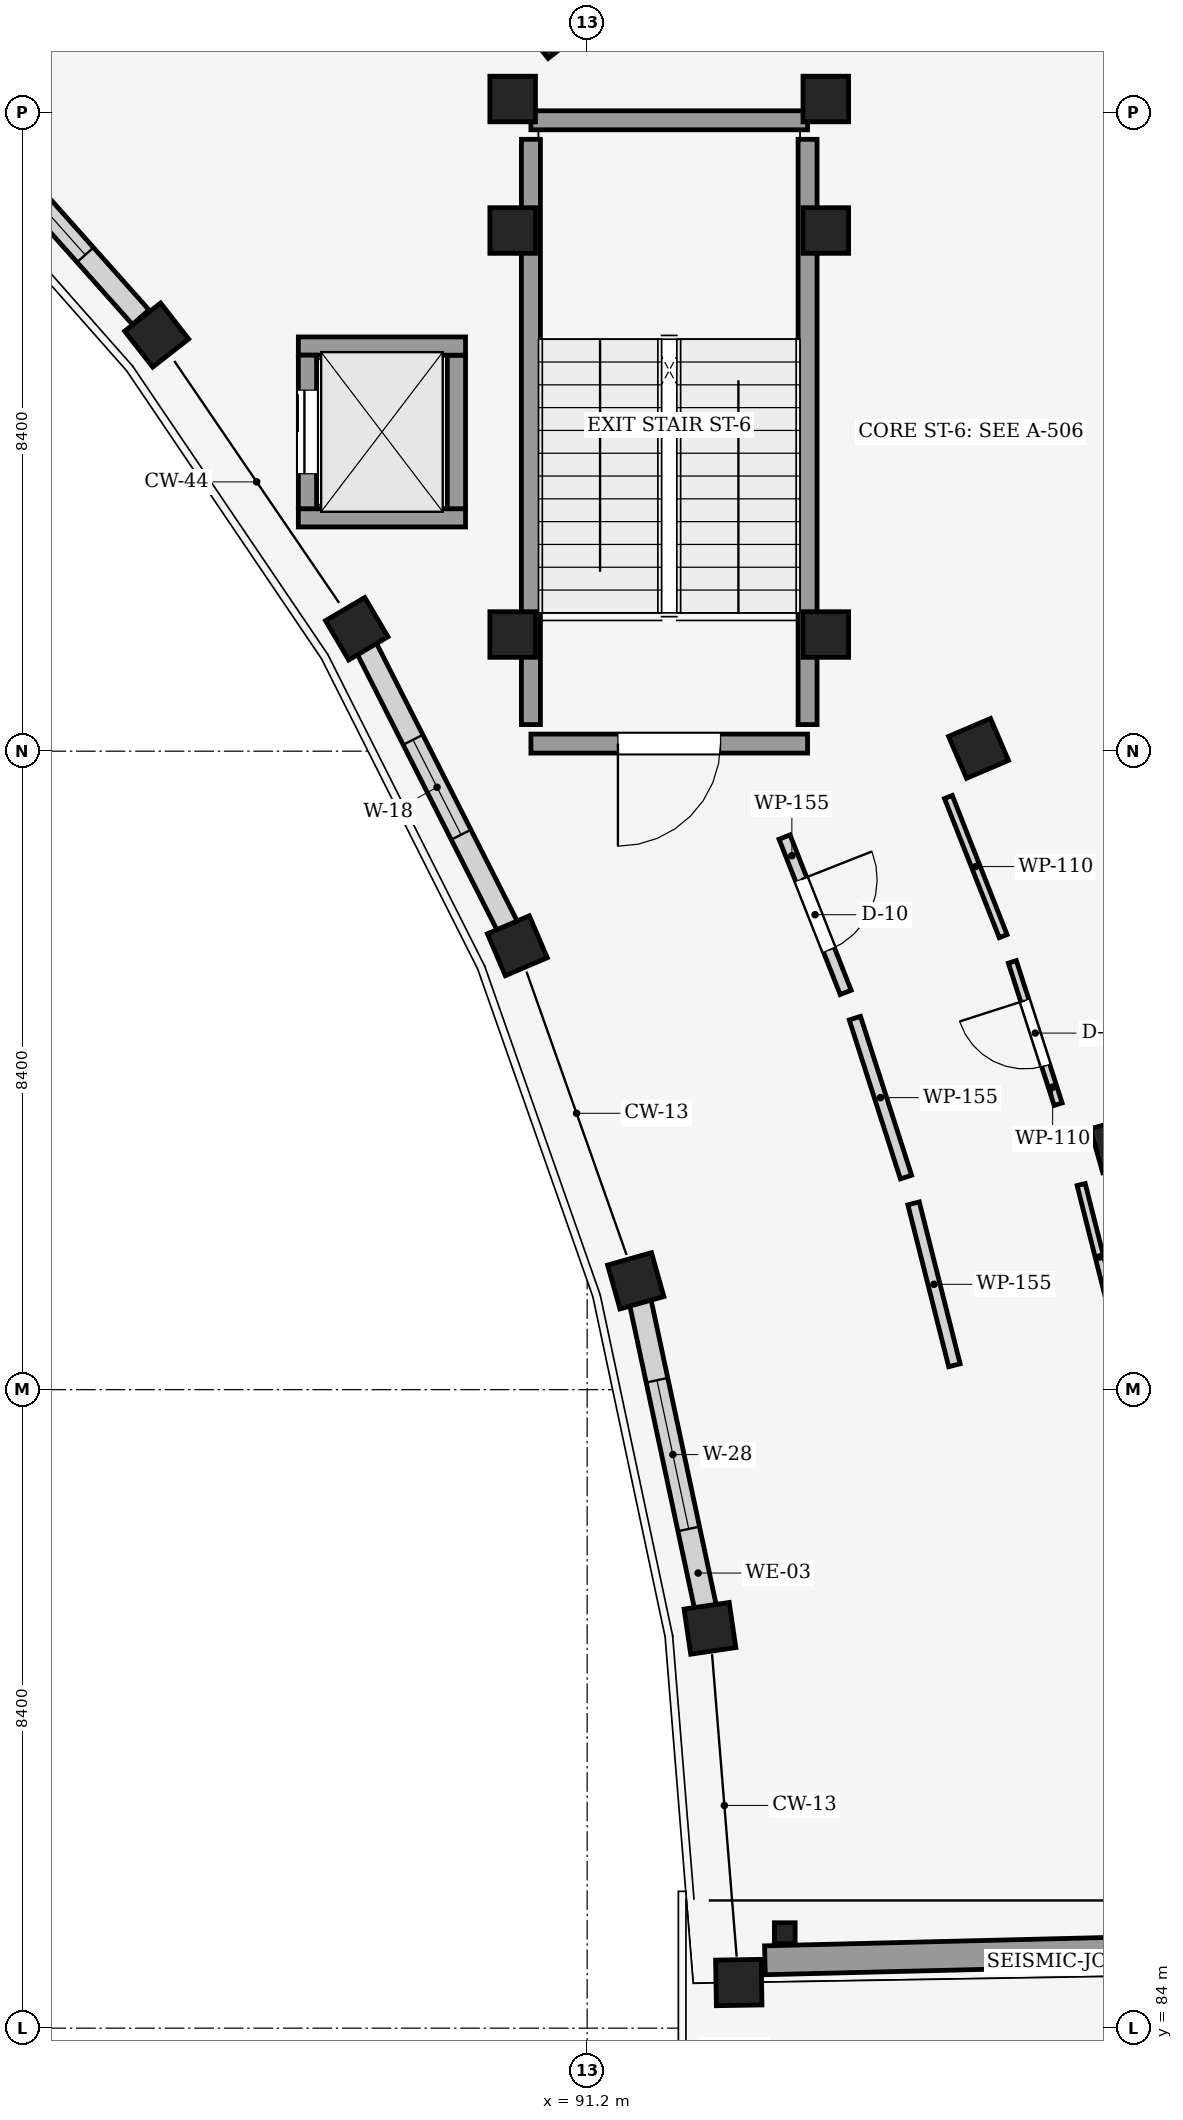
"""IFC4 building model, lengths in metres.
Left out: names, types, materials, properties, quantities, classifications, styles, units other than length and angle.
Written with IfcOpenShell. Run it as: python <this file> out.ifc"""

import sys

from ifc_helpers import new_model, si_unit, direction, frame, frame_2d, origin, origin_2d, place, context, subcontext, project, spatial, rectangle, hollow_circle, extrude, element, fill, save


model = new_model("IFC4")
c1 = context("Model", 3, precision=1e-05, world=origin(), true_north=direction((0.0, 1.0)))
c2 = subcontext(c1, "Body", "Model", "MODEL_VIEW")
j1 = project(units=[si_unit("LENGTHUNIT", "METRE"), si_unit("PLANEANGLEUNIT", "RADIAN")], contexts=[c1])
p1 = place(None, origin())
s1 = spatial("IfcSite", under=j1, at=p1, CompositionType="ELEMENT")
p2 = place(p1, origin())
s2 = spatial("IfcBuilding", under=s1, at=p2, CompositionType="ELEMENT")
p3 = place(p2, frame((0.0, 0.0, 17.25)))
s3 = spatial("IfcBuildingStorey", under=s2, at=p3, CompositionType="ELEMENT", Elevation=17.25)
for number, where, z_axis, x_axis in (
    (1, (93.195, 84.6, 0.0), (0.0, 0.0, 1.0), (1.0, 0.017, 0.0)),
    (2, (92.816, 89.26, 0.0), (0.0, 0.0, 1.0), (0.989, 0.145, 0.0)),
    (3, (91.839, 93.832, 0.0), (0.0, 0.0, 1.0), (0.962, 0.272, 0.0)),
    (4, (98.191, 95.625, 0.0), (0.0, 0.0, 1.0), (0.962, 0.272, 0.0)),
    (5, (90.281, 98.24, 0.0), (0.0, 0.0, 1.0), (0.919, 0.393, 0.0)),
    (6, (96.349, 100.837, 0.0), (0.0, 0.0, 1.0), (0.919, 0.393, 0.0)),
    (7, (88.168, 102.411, 0.0), (0.0, 0.0, 1.0), (0.861, 0.509, 0.0)),
    (8, (85.536, 106.274, 0.0), (0.0, 0.0, 1.0), (0.788, 0.615, 0.0)),
    (9, (90.738, 110.336, 0.0), (0.0, 0.0, 1.0), (0.788, 0.615, 0.0)),
):
    element("IfcColumn", number, at=place(p3, frame(where, z_axis=z_axis, x_axis=x_axis)), inside=s3, PredefinedType="COLUMN", context=c2, shape_type="SweptSolid", body=[
        extrude(rectangle(XDim=0.6, YDim=0.6, at=origin_2d()), origin(), (0.0, 0.0, 1.0), 4.05),
    ])
p4 = place(p3, frame((93.8, 85.25, 0.0), z_axis=(0.0, 0.0, 1.0), x_axis=(1.0, 0.0, 0.0)))
e10 = element("IfcColumn", 10, at=p4, inside=s3, PredefinedType="COLUMN", context=c2, shape_type="SweptSolid", body=[
    extrude(hollow_circle(Radius=0.136, WallThickness=0.016, at=origin_2d()), origin(), (0.0, 0.0, 1.0), 3.82),
])
for number, where, z_axis, x_axis in (
    (11, (94.34, 102.335, 0.0), (0.0, 0.0, 1.0), (1.0, 0.0, 0.0)),
    (12, (90.22, 102.335, 0.0), (0.0, 0.0, 1.0), (1.0, 0.0, 0.0)),
    (13, (94.34, 107.65, 0.0), (0.0, 0.0, 1.0), (1.0, 0.0, 0.0)),
    (14, (90.22, 107.65, 0.0), (0.0, 0.0, 1.0), (1.0, 0.0, 0.0)),
    (15, (94.34, 109.38, 0.0), (0.0, 0.0, 1.0), (1.0, 0.0, 0.0)),
    (16, (90.22, 109.38, 0.0), (0.0, 0.0, 1.0), (1.0, 0.0, 0.0)),
):
    element("IfcColumn", number, at=place(p3, frame(where, z_axis=z_axis, x_axis=x_axis)), inside=s3, PredefinedType="COLUMN", context=c2, shape_type="SweptSolid", body=[
        extrude(rectangle(XDim=0.6, YDim=0.6, at=origin_2d()), origin(), (0.0, 0.0, 1.0), 4.05),
    ])
p5 = place(p3, frame((92.766, 89.495, 0.0), z_axis=(0.0, 0.0, 1.0), x_axis=(-0.208893062569, 0.977938489073, 0.0)))
e17 = element("IfcWall", 17, at=p5, inside=s3, PredefinedType="STANDARD", context=c2, shape_type="SweptSolid", body=[
    extrude(rectangle(XDim=4.195, YDim=0.29, at=frame_2d((2.097, 0.0))), origin(), (0.0, 0.0, 1.0), 2.935),
])
p6 = place(p5, frame((1.097, 0.0, 0.85)))
e18 = element("IfcOpeningElement", 18, at=p6, cuts=e17, PredefinedType="OPENING", context=c2, shape_type="SweptSolid", body=[
    extrude(rectangle(XDim=2.0, YDim=1.85, at=frame_2d((1.0, 0.925))), frame((0.0, 0.155, 0.0), z_axis=(0.0, -1.0, 0.0), x_axis=(1.0, 0.0, 0.0)), (0.0, 0.0, 1.0), 0.31),
])
p7 = place(p3, frame((90.162, 98.475, 0.0), z_axis=(0.0, 0.0, 1.0), x_axis=(-0.451915465701, 0.89206076691, 0.0)))
e19 = element("IfcWall", 19, at=p7, inside=s3, PredefinedType="STANDARD", context=c2, shape_type="SweptSolid", body=[
    extrude(rectangle(XDim=4.148, YDim=0.29, at=frame_2d((2.074, 0.0))), origin(), (0.0, 0.0, 1.0), 3.7),
])
p8 = place(p7, frame((1.374, 0.0, 0.85)))
e20 = element("IfcOpeningElement", 20, at=p8, cuts=e19, PredefinedType="OPENING", context=c2, shape_type="SweptSolid", body=[
    extrude(rectangle(XDim=1.4, YDim=1.65, at=frame_2d((0.7, 0.825))), frame((0.0, 0.155, 0.0), z_axis=(0.0, -1.0, 0.0), x_axis=(1.0, 0.0, 0.0)), (0.0, 0.0, 1.0), 0.31),
])
p9 = place(p3, frame((95.786, 113.916, 0.0), z_axis=(0.0, 0.0, 1.0), x_axis=(0.563132935525, -0.826366321269, 0.0)))
e21 = element("IfcWall", 21, at=p9, inside=s3, PredefinedType="STANDARD", context=c2, shape_type="SweptSolid", body=[
    extrude(rectangle(XDim=5.76, YDim=0.34, at=frame_2d((2.88, 0.0))), origin(), (0.0, 0.0, 1.0), 2.935),
])
p10 = place(p9, frame((2.18, 0.0, 0.85)))
e22 = element("IfcOpeningElement", 22, at=p10, cuts=e21, PredefinedType="OPENING", context=c2, shape_type="SweptSolid", body=[
    extrude(rectangle(XDim=1.4, YDim=1.35, at=frame_2d((0.7, 0.675))), frame((0.0, 0.18, 0.0), z_axis=(0.0, -1.0, 0.0), x_axis=(1.0, 0.0, 0.0)), (0.0, 0.0, 1.0), 0.36),
])
p11 = place(p3, frame((85.326, 106.51, 0.0), z_axis=(0.0, 0.0, 1.0), x_axis=(-0.664947894459, 0.74688974933, 0.0)))
e23 = element("IfcWall", 23, at=p11, inside=s3, PredefinedType="STANDARD", context=c2, shape_type="SweptSolid", body=[
    extrude(rectangle(XDim=4.046, YDim=0.29, at=frame_2d((2.023, 0.0))), origin(), (0.0, 0.0, 1.0), 3.085),
])
p12 = place(p11, frame((1.098, 0.0, 0.85)))
e24 = element("IfcOpeningElement", 24, at=p12, cuts=e23, PredefinedType="OPENING", context=c2, shape_type="SweptSolid", body=[
    extrude(rectangle(XDim=1.85, YDim=1.65, at=frame_2d((0.925, 0.825))), frame((0.0, 0.155, 0.0), z_axis=(0.0, -1.0, 0.0), x_axis=(1.0, 0.0, 0.0)), (0.0, 0.0, 1.0), 0.31),
])
p13 = place(p3, frame((103.85, 85.145, 0.0), z_axis=(0.0, 0.0, 1.0), x_axis=(-0.999701591947, -0.024427997417, 0.0)))
e25 = element("IfcWall", 25, at=p13, inside=s3, PredefinedType="SHEAR", context=c2, shape_type="SweptSolid", body=[
    extrude(rectangle(XDim=10.314, YDim=0.38, at=frame_2d((5.157, 0.0))), origin(), (0.0, 0.0, 1.0), 3.75),
])
p14 = place(p3, frame((94.1, 100.9, 0.0), z_axis=(0.0, 0.0, 1.0), x_axis=(-1.0, 0.0, 0.0)))
e26 = element("IfcWall", 26, at=p14, inside=s3, PredefinedType="SHEAR", context=c2, shape_type="SweptSolid", body=[
    extrude(rectangle(XDim=3.64, YDim=0.25, at=frame_2d((1.82, 0.0))), origin(), (0.0, 0.0, 1.0), 4.05),
])
p15 = place(p14, frame((1.145, 0.0, 0.0)))
e27 = element("IfcOpeningElement", 27, at=p15, cuts=e26, PredefinedType="OPENING", context=c2, shape_type="SweptSolid", body=[
    extrude(rectangle(XDim=1.35, YDim=2.2, at=frame_2d((0.675, 1.1))), frame((0.0, 0.135, 0.0), z_axis=(0.0, -1.0, 0.0), x_axis=(1.0, 0.0, 0.0)), (0.0, 0.0, 1.0), 0.27),
])
p16 = place(p3, frame((90.46, 101.15, 0.0), z_axis=(0.0, 0.0, 1.0), x_axis=(0.0, 1.0, 0.0)))
e28 = element("IfcWall", 28, at=p16, inside=s3, PredefinedType="SHEAR", context=c2, shape_type="SweptSolid", body=[
    extrude(rectangle(XDim=7.7, YDim=0.25, at=frame_2d((3.85, 0.0))), origin(), (0.0, 0.0, 1.0), 4.05),
])
p17 = place(p3, frame((90.46, 109.1, 0.0), z_axis=(0.0, 0.0, 1.0), x_axis=(1.0, 0.0, 0.0)))
e29 = element("IfcWall", 29, at=p17, inside=s3, PredefinedType="SHEAR", context=c2, shape_type="SweptSolid", body=[
    extrude(rectangle(XDim=3.64, YDim=0.25, at=frame_2d((1.82, 0.0))), origin(), (0.0, 0.0, 1.0), 4.05),
])
p18 = place(p3, frame((94.1, 108.85, 0.0), z_axis=(0.0, 0.0, 1.0), x_axis=(0.0, -1.0, 0.0)))
e30 = element("IfcWall", 30, at=p18, inside=s3, PredefinedType="SHEAR", context=c2, shape_type="SweptSolid", body=[
    extrude(rectangle(XDim=7.7, YDim=0.25, at=frame_2d((3.85, 0.0))), origin(), (0.0, 0.0, 1.0), 4.05),
])
p19 = place(p3, frame((89.6, 103.87, 0.0), z_axis=(0.0, 0.0, 1.0), x_axis=(-1.0, 0.0, 0.0)))
e31 = element("IfcWall", 31, at=p19, inside=s3, PredefinedType="SHEAR", context=c2, shape_type="SweptSolid", body=[
    extrude(rectangle(XDim=2.2, YDim=0.24, at=frame_2d((1.1, 0.0))), origin(), (0.0, 0.0, 1.0), 4.05),
])
p20 = place(p3, frame((89.48, 106.01, 0.0), z_axis=(0.0, 0.0, 1.0), x_axis=(0.0, -1.0, 0.0)))
e32 = element("IfcWall", 32, at=p20, inside=s3, PredefinedType="SHEAR", context=c2, shape_type="SweptSolid", body=[
    extrude(rectangle(XDim=2.02, YDim=0.24, at=frame_2d((1.01, 0.0))), origin(), (0.0, 0.0, 1.0), 4.05),
])
p21 = place(p3, frame((87.4, 106.13, 0.0), z_axis=(0.0, 0.0, 1.0), x_axis=(1.0, 0.0, 0.0)))
e33 = element("IfcWall", 33, at=p21, inside=s3, PredefinedType="SHEAR", context=c2, shape_type="SweptSolid", body=[
    extrude(rectangle(XDim=2.2, YDim=0.24, at=frame_2d((1.1, 0.0))), origin(), (0.0, 0.0, 1.0), 4.05),
])
p22 = place(p3, frame((87.52, 103.99, 0.0), z_axis=(0.0, 0.0, 1.0), x_axis=(0.0, 1.0, 0.0)))
e34 = element("IfcWall", 34, at=p22, inside=s3, PredefinedType="SHEAR", context=c2, shape_type="SweptSolid", body=[
    extrude(rectangle(XDim=2.02, YDim=0.24, at=frame_2d((1.01, 0.0))), origin(), (0.0, 0.0, 1.0), 4.05),
])
p23 = place(p22, frame((0.46, 0.0, 0.0)))
e35 = element("IfcOpeningElement", 35, at=p23, cuts=e34, PredefinedType="OPENING", context=c2, shape_type="SweptSolid", body=[
    extrude(rectangle(XDim=1.1, YDim=2.15, at=frame_2d((0.55, 1.075))), frame((0.0, 0.13, 0.0), z_axis=(0.0, -1.0, 0.0), x_axis=(1.0, 0.0, 0.0)), (0.0, 0.0, 1.0), 0.26),
])
p24 = place(p3, frame((97.397, 96.156, 0.0), z_axis=(0.0, 0.0, 1.0), x_axis=(-0.306193985411, 0.951969139887, 0.0)))
e36 = element("IfcWall", 36, at=p24, inside=s3, PredefinedType="PARTITIONING", context=c2, shape_type="SweptSolid", body=[
    extrude(rectangle(XDim=1.967, YDim=0.11, at=frame_2d((0.983, 0.0))), origin(), (0.0, 0.0, 1.0), 3.62),
])
p25 = place(p24, frame((0.533, 0.0, 0.0)))
e37 = element("IfcOpeningElement", 37, at=p25, cuts=e36, PredefinedType="OPENING", context=c2, shape_type="SweptSolid", body=[
    extrude(rectangle(XDim=0.9, YDim=2.1, at=frame_2d((0.45, 1.05))), frame((0.0, 0.065, 0.0), z_axis=(0.0, -1.0, 0.0), x_axis=(1.0, 0.0, 0.0)), (0.0, 0.0, 1.0), 0.13),
])
p26 = place(p3, frame((96.673, 98.367, 0.0), z_axis=(0.0, 0.0, 1.0), x_axis=(-0.366420321181, 0.93044943346, 0.0)))
e38 = element("IfcWall", 38, at=p26, inside=s3, PredefinedType="PARTITIONING", context=c2, shape_type="SweptSolid", body=[
    extrude(rectangle(XDim=1.967, YDim=0.11, at=frame_2d((0.983, 0.0))), origin(), (0.0, 0.0, 1.0), 3.62),
])
p27 = place(p3, frame((98.181, 93.191, 0.0), z_axis=(0.0, 0.0, 1.0), x_axis=(-0.244871130076, 0.969555635152, 0.0)))
e39 = element("IfcWall", 39, at=p27, inside=s3, PredefinedType="PARTITIONING", context=c2, shape_type="SweptSolid", body=[
    extrude(rectangle(XDim=1.967, YDim=0.11, at=frame_2d((0.983, 0.0))), origin(), (0.0, 0.0, 1.0), 2.935),
])
p28 = place(p3, frame((93.797, 99.67, 0.0), z_axis=(0.0, 0.0, 1.0), x_axis=(0.366364143448, -0.930471554856, 0.0)))
e40 = element("IfcWall", 40, at=p28, inside=s3, PredefinedType="PARTITIONING", context=c2, shape_type="SweptSolid", body=[
    extrude(rectangle(XDim=2.197, YDim=0.155, at=frame_2d((1.098, 0.0))), origin(), (0.0, 0.0, 1.0), 3.62),
])
p29 = place(p28, frame((0.598, 0.0, 0.0)))
e41 = element("IfcOpeningElement", 41, at=p29, cuts=e40, PredefinedType="OPENING", context=c2, shape_type="SweptSolid", body=[
    extrude(rectangle(XDim=1.0, YDim=2.22, at=frame_2d((0.5, 1.11))), frame((0.0, 0.087, 0.0), z_axis=(0.0, -1.0, 0.0), x_axis=(1.0, 0.0, 0.0)), (0.0, 0.0, 1.0), 0.175),
])
for number, where, z_axis, x_axis in (
    (42, (94.723, 97.288, 0.0), (0.0, 0.0, 1.0), (0.306, -0.952, 0.0)),
    (43, (95.495, 94.851, 0.0), (0.0, 0.0, 1.0), (0.245, -0.97, 0.0)),
):
    element("IfcWall", number, at=place(p3, frame(where, z_axis=z_axis, x_axis=x_axis)), inside=s3, PredefinedType="PARTITIONING", context=c2, shape_type="SweptSolid", body=[
        extrude(rectangle(XDim=2.197, YDim=0.155, at=frame_2d((1.098, 0.0))), origin(), (0.0, 0.0, 1.0), 2.935),
    ])
p30 = place(p6, origin())
e44 = element("IfcWindow", 44, at=p30, inside=s3, PartitioningType="SINGLE_PANEL", PredefinedType="WINDOW", context=c2, shape_type="SweptSolid", body=[
    extrude(rectangle(XDim=2.0, YDim=1.85, at=frame_2d((1.0, 0.925))), frame((0.0, 0.03, 0.0), z_axis=(0.0, -1.0, 0.0), x_axis=(1.0, 0.0, 0.0)), (0.0, 0.0, 1.0), 0.06),
])
fill(e18, e44)
p31 = place(p8, origin())
e45 = element("IfcWindow", 45, at=p31, inside=s3, PartitioningType="SINGLE_PANEL", PredefinedType="WINDOW", context=c2, shape_type="SweptSolid", body=[
    extrude(rectangle(XDim=1.4, YDim=1.65, at=frame_2d((0.7, 0.825))), frame((0.0, 0.03, 0.0), z_axis=(0.0, -1.0, 0.0), x_axis=(1.0, 0.0, 0.0)), (0.0, 0.0, 1.0), 0.06),
])
fill(e20, e45)
p32 = place(p12, origin())
e46 = element("IfcWindow", 46, at=p32, inside=s3, PartitioningType="SINGLE_PANEL", PredefinedType="WINDOW", context=c2, shape_type="SweptSolid", body=[
    extrude(rectangle(XDim=1.85, YDim=1.65, at=frame_2d((0.925, 0.825))), frame((0.0, 0.03, 0.0), z_axis=(0.0, -1.0, 0.0), x_axis=(1.0, 0.0, 0.0)), (0.0, 0.0, 1.0), 0.06),
])
fill(e24, e46)
p33 = place(p15, origin())
e47 = element("IfcDoor", 47, at=p33, inside=s3, OperationType="SINGLE_SWING_RIGHT", PredefinedType="DOOR", context=c2, shape_type="SweptSolid", body=[
    extrude(rectangle(XDim=1.35, YDim=2.2, at=frame_2d((0.675, 1.1))), frame((0.0, 0.025, 0.0), z_axis=(0.0, -1.0, 0.0), x_axis=(1.0, 0.0, 0.0)), (0.0, 0.0, 1.0), 0.05),
])
fill(e27, e47)
p34 = place(p23, origin())
e48 = element("IfcDoor", 48, at=p34, inside=s3, OperationType="SLIDING_TO_RIGHT", PredefinedType="DOOR", context=c2, shape_type="SweptSolid", body=[
    extrude(rectangle(XDim=1.1, YDim=2.15, at=frame_2d((0.55, 1.075))), frame((0.0, 0.025, 0.0), z_axis=(0.0, -1.0, 0.0), x_axis=(1.0, 0.0, 0.0)), (0.0, 0.0, 1.0), 0.05),
])
fill(e35, e48)
p35 = place(p25, origin())
e49 = element("IfcDoor", 49, at=p35, inside=s3, OperationType="SINGLE_SWING_RIGHT", PredefinedType="DOOR", context=c2, shape_type="SweptSolid", body=[
    extrude(rectangle(XDim=0.9, YDim=2.1, at=frame_2d((0.45, 1.05))), frame((0.0, 0.025, 0.0), z_axis=(0.0, -1.0, 0.0), x_axis=(1.0, 0.0, 0.0)), (0.0, 0.0, 1.0), 0.05),
])
fill(e37, e49)
p36 = place(p29, origin())
e50 = element("IfcDoor", 50, at=p36, inside=s3, OperationType="SINGLE_SWING_LEFT", PredefinedType="DOOR", context=c2, shape_type="SweptSolid", body=[
    extrude(rectangle(XDim=1.0, YDim=2.22, at=frame_2d((0.5, 1.11))), frame((0.0, 0.025, 0.0), z_axis=(0.0, -1.0, 0.0), x_axis=(1.0, 0.0, 0.0)), (0.0, 0.0, 1.0), 0.05),
])
fill(e41, e50)
save(model, sys.argv[1])
